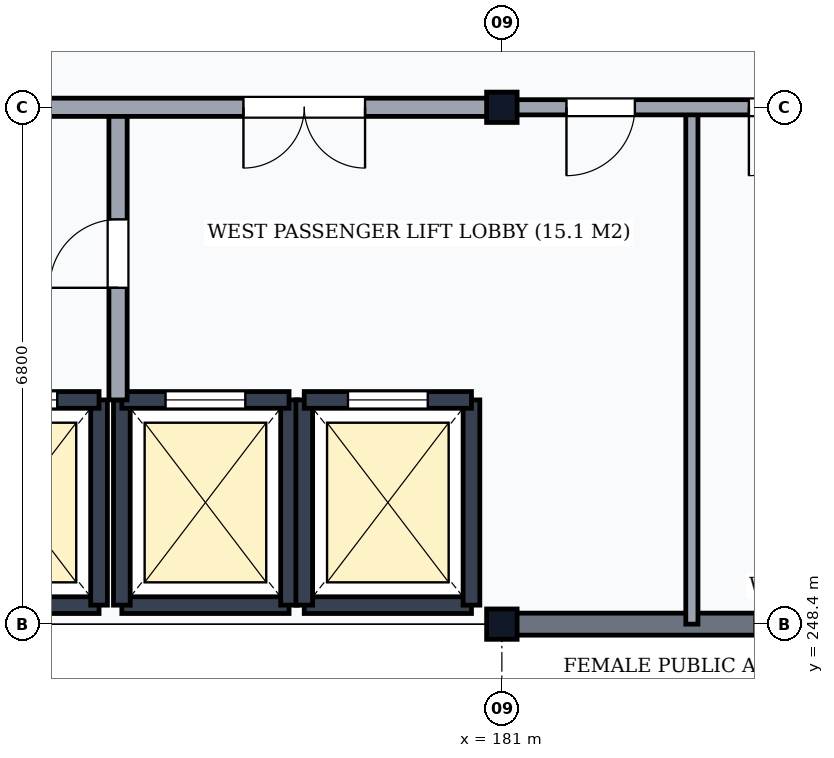
"""IFC4 building model, lengths in metres.
Left out: names, types, materials, properties, quantities, classifications, styles, units other than length and angle.
Written with IfcOpenShell. Run it as: python <this file> out.ifc"""

import sys

from ifc_helpers import new_model, si_unit, direction, frame, frame_2d, origin, origin_2d, place, context, subcontext, project, spatial, rectangle, i_section, extrude, element, fill, save


model = new_model("IFC4")
c1 = context("Model", 3, precision=1e-05, world=origin(), true_north=direction((0.0, 1.0)))
c2 = subcontext(c1, "Body", "Model", "MODEL_VIEW")
j1 = project(units=[si_unit("LENGTHUNIT", "METRE"), si_unit("PLANEANGLEUNIT", "RADIAN")], contexts=[c1])
p1 = place(None, origin())
s1 = spatial("IfcSite", under=j1, at=p1, CompositionType="ELEMENT")
p2 = place(p1, origin())
s2 = spatial("IfcBuilding", under=s1, at=p2, CompositionType="ELEMENT")
p3 = place(p2, frame((0.0, 0.0, 10.5)))
s3 = spatial("IfcBuildingStorey", under=s2, at=p3, CompositionType="ELEMENT", Elevation=10.5)
for number, where, z_axis, x_axis in (
    (1, (181.0, 248.4, 0.0), (0.0, 0.0, 1.0), (1.0, 0.0, 0.0)),
    (2, (181.0, 255.2, 0.0), (0.0, 0.0, 1.0), (1.0, 0.0, 0.0)),
):
    element("IfcColumn", number, at=place(p3, frame(where, z_axis=z_axis, x_axis=x_axis)), inside=s3, PredefinedType="COLUMN", context=c2, shape_type="SweptSolid", body=[
        extrude(i_section(OverallWidth=0.401, OverallDepth=0.399, WebThickness=0.025, FlangeThickness=0.04, FilletRadius=0.015, at=origin_2d()), origin(), (0.0, 0.0, 1.0), 5.1),
    ])
p4 = place(p3, frame((181.006, 248.4, 0.0), z_axis=(0.0, 0.0, 1.0), x_axis=(1.0, 0.0, 0.0)))
e3 = element("IfcWall", 3, at=p4, inside=s3, PredefinedType="SOLIDWALL", context=c2, shape_type="SweptSolid", body=[
    extrude(rectangle(XDim=7.988, YDim=0.29, at=frame_2d((3.994, 0.0))), origin(), (0.0, 0.0, 1.0), 4.528),
])
p5 = place(p4, frame((3.319, 0.0, 0.85)))
e4 = element("IfcOpeningElement", 4, at=p5, cuts=e3, PredefinedType="OPENING", context=c2, shape_type="SweptSolid", body=[
    extrude(rectangle(XDim=0.75, YDim=2.0, at=frame_2d((0.375, 1.0))), frame((0.0, 0.16, 0.0), z_axis=(0.0, -1.0, 0.0), x_axis=(1.0, 0.0, 0.0)), (0.0, 0.0, 1.0), 0.32),
])
p6 = place(p3, frame((173.5, 248.65, 0.0), z_axis=(0.0, 0.0, 1.0), x_axis=(1.0, 0.0, 0.0)))
e5 = element("IfcWall", 5, at=p6, inside=s3, PredefinedType="SHEAR", context=c2, shape_type="SweptSolid", body=[
    extrude(rectangle(XDim=2.2, YDim=0.22, at=frame_2d((1.1, 0.0))), origin(), (0.0, 0.0, 1.0), 4.84),
])
p7 = place(p3, frame((175.7, 248.65, 0.0), z_axis=(0.0, 0.0, 1.0), x_axis=(0.0, 1.0, 0.0)))
e6 = element("IfcWall", 6, at=p7, inside=s3, PredefinedType="SHEAR", context=c2, shape_type="SweptSolid", body=[
    extrude(rectangle(XDim=2.7, YDim=0.22, at=frame_2d((1.35, 0.0))), origin(), (0.0, 0.0, 1.0), 4.84),
])
p8 = place(p3, frame((173.5, 251.35, 0.0), z_axis=(0.0, 0.0, 1.0), x_axis=(1.0, 0.0, 0.0)))
e7 = element("IfcWall", 7, at=p8, inside=s3, PredefinedType="SHEAR", context=c2, shape_type="SweptSolid", body=[
    extrude(rectangle(XDim=2.2, YDim=0.22, at=frame_2d((1.1, 0.0))), origin(), (0.0, 0.0, 1.0), 4.84),
])
p9 = place(p8, frame((0.55, 0.0, 0.0)))
e8 = element("IfcOpeningElement", 8, at=p9, cuts=e7, PredefinedType="OPENING", context=c2, shape_type="SweptSolid", body=[
    extrude(rectangle(XDim=1.1, YDim=2.15, at=frame_2d((0.55, 1.075))), frame((0.0, 0.125, 0.0), z_axis=(0.0, -1.0, 0.0), x_axis=(1.0, 0.0, 0.0)), (0.0, 0.0, 1.0), 0.25),
])
p10 = place(p3, frame((176.0, 248.65, 0.0), z_axis=(0.0, 0.0, 1.0), x_axis=(1.0, 0.0, 0.0)))
e9 = element("IfcWall", 9, at=p10, inside=s3, PredefinedType="SHEAR", context=c2, shape_type="SweptSolid", body=[
    extrude(rectangle(XDim=2.2, YDim=0.22, at=frame_2d((1.1, 0.0))), origin(), (0.0, 0.0, 1.0), 4.84),
])
for number, where, z_axis, x_axis in (
    (10, (176.0, 248.65, 0.0), (0.0, 0.0, 1.0), (0.0, 1.0, 0.0)),
    (11, (178.2, 248.65, 0.0), (0.0, 0.0, 1.0), (0.0, 1.0, 0.0)),
):
    element("IfcWall", number, at=place(p3, frame(where, z_axis=z_axis, x_axis=x_axis)), inside=s3, PredefinedType="SHEAR", context=c2, shape_type="SweptSolid", body=[
        extrude(rectangle(XDim=2.7, YDim=0.22, at=frame_2d((1.35, 0.0))), origin(), (0.0, 0.0, 1.0), 4.84),
    ])
p11 = place(p3, frame((176.0, 251.35, 0.0), z_axis=(0.0, 0.0, 1.0), x_axis=(1.0, 0.0, 0.0)))
e12 = element("IfcWall", 12, at=p11, inside=s3, PredefinedType="SHEAR", context=c2, shape_type="SweptSolid", body=[
    extrude(rectangle(XDim=2.2, YDim=0.22, at=frame_2d((1.1, 0.0))), origin(), (0.0, 0.0, 1.0), 4.84),
])
p12 = place(p11, frame((0.575, 0.0, 0.0)))
e13 = element("IfcOpeningElement", 13, at=p12, cuts=e12, PredefinedType="OPENING", context=c2, shape_type="SweptSolid", body=[
    extrude(rectangle(XDim=1.05, YDim=2.15, at=frame_2d((0.525, 1.075))), frame((0.0, 0.125, 0.0), z_axis=(0.0, -1.0, 0.0), x_axis=(1.0, 0.0, 0.0)), (0.0, 0.0, 1.0), 0.25),
])
p13 = place(p3, frame((178.4, 248.65, 0.0), z_axis=(0.0, 0.0, 1.0), x_axis=(1.0, 0.0, 0.0)))
e14 = element("IfcWall", 14, at=p13, inside=s3, PredefinedType="SHEAR", context=c2, shape_type="SweptSolid", body=[
    extrude(rectangle(XDim=2.2, YDim=0.22, at=frame_2d((1.1, 0.0))), origin(), (0.0, 0.0, 1.0), 4.84),
])
for number, where, z_axis, x_axis in (
    (15, (178.4, 248.65, 0.0), (0.0, 0.0, 1.0), (0.0, 1.0, 0.0)),
    (16, (180.6, 248.65, 0.0), (0.0, 0.0, 1.0), (0.0, 1.0, 0.0)),
):
    element("IfcWall", number, at=place(p3, frame(where, z_axis=z_axis, x_axis=x_axis)), inside=s3, PredefinedType="SHEAR", context=c2, shape_type="SweptSolid", body=[
        extrude(rectangle(XDim=2.7, YDim=0.22, at=frame_2d((1.35, 0.0))), origin(), (0.0, 0.0, 1.0), 4.84),
    ])
p14 = place(p3, frame((178.4, 251.35, 0.0), z_axis=(0.0, 0.0, 1.0), x_axis=(1.0, 0.0, 0.0)))
e17 = element("IfcWall", 17, at=p14, inside=s3, PredefinedType="SHEAR", context=c2, shape_type="SweptSolid", body=[
    extrude(rectangle(XDim=2.2, YDim=0.22, at=frame_2d((1.1, 0.0))), origin(), (0.0, 0.0, 1.0), 4.84),
])
p15 = place(p14, frame((0.575, 0.0, 0.0)))
e18 = element("IfcOpeningElement", 18, at=p15, cuts=e17, PredefinedType="OPENING", context=c2, shape_type="SweptSolid", body=[
    extrude(rectangle(XDim=1.05, YDim=2.15, at=frame_2d((0.525, 1.075))), frame((0.0, 0.125, 0.0), z_axis=(0.0, -1.0, 0.0), x_axis=(1.0, 0.0, 0.0)), (0.0, 0.0, 1.0), 0.25),
])
p16 = place(p3, frame((175.95, 251.35, 0.0), z_axis=(0.0, 0.0, 1.0), x_axis=(0.0, 1.0, 0.0)))
e19 = element("IfcWall", 19, at=p16, inside=s3, PredefinedType="PARTITIONING", context=c2, shape_type="SweptSolid", body=[
    extrude(rectangle(XDim=3.85, YDim=0.24, at=frame_2d((1.925, 0.0))), origin(), (0.0, 0.0, 1.0), 4.84),
])
p17 = place(p16, frame((1.475, 0.0, 0.0)))
e20 = element("IfcOpeningElement", 20, at=p17, cuts=e19, PredefinedType="OPENING", context=c2, shape_type="SweptSolid", body=[
    extrude(rectangle(XDim=0.9, YDim=2.1, at=frame_2d((0.45, 1.05))), frame((0.0, 0.135, 0.0), z_axis=(0.0, -1.0, 0.0), x_axis=(1.0, 0.0, 0.0)), (0.0, 0.0, 1.0), 0.27),
])
p18 = place(p3, frame((183.5, 248.4, 0.0), z_axis=(0.0, 0.0, 1.0), x_axis=(0.0, 1.0, 0.0)))
e21 = element("IfcWall", 21, at=p18, inside=s3, PredefinedType="PARTITIONING", context=c2, shape_type="SweptSolid", body=[
    extrude(rectangle(XDim=6.8, YDim=0.16, at=frame_2d((3.4, 0.0))), origin(), (0.0, 0.0, 1.0), 4.84),
])
p19 = place(p3, frame((173.0, 255.2, 0.0), z_axis=(0.0, 0.0, 1.0), x_axis=(1.0, 0.0, 0.0)))
e22 = element("IfcWall", 22, at=p19, inside=s3, PredefinedType="PARTITIONING", context=c2, shape_type="SweptSolid", body=[
    extrude(rectangle(XDim=8.0, YDim=0.24, at=frame_2d((4.0, 0.0))), origin(), (0.0, 0.0, 1.0), 4.338),
])
p20 = place(p19, frame((1.05, 0.0, 0.0)))
e23 = element("IfcOpeningElement", 23, at=p20, cuts=e22, PredefinedType="OPENING", context=c2, shape_type="SweptSolid", body=[
    extrude(rectangle(XDim=1.0, YDim=2.1, at=frame_2d((0.5, 1.05))), frame((0.0, 0.135, 0.0), z_axis=(0.0, -1.0, 0.0), x_axis=(1.0, 0.0, 0.0)), (0.0, 0.0, 1.0), 0.27),
])
p21 = place(p19, frame((4.6, 0.0, 0.0)))
e24 = element("IfcOpeningElement", 24, at=p21, cuts=e22, PredefinedType="OPENING", context=c2, shape_type="SweptSolid", body=[
    extrude(rectangle(XDim=1.6, YDim=2.25, at=frame_2d((0.8, 1.125))), frame((0.0, 0.135, 0.0), z_axis=(0.0, -1.0, 0.0), x_axis=(1.0, 0.0, 0.0)), (0.0, 0.0, 1.0), 0.27),
])
p22 = place(p3, frame((181.0, 255.2, 0.0), z_axis=(0.0, 0.0, 1.0), x_axis=(1.0, 0.0, 0.0)))
e25 = element("IfcWall", 25, at=p22, inside=s3, PredefinedType="PARTITIONING", context=c2, shape_type="SweptSolid", body=[
    extrude(rectangle(XDim=8.0, YDim=0.2, at=frame_2d((4.0, 0.0))), origin(), (0.0, 0.0, 1.0), 4.338),
])
p23 = place(p22, frame((0.85, 0.0, 0.0)))
e26 = element("IfcOpeningElement", 26, at=p23, cuts=e25, PredefinedType="OPENING", context=c2, shape_type="SweptSolid", body=[
    extrude(rectangle(XDim=0.9, YDim=2.1, at=frame_2d((0.45, 1.05))), frame((0.0, 0.115, 0.0), z_axis=(0.0, -1.0, 0.0), x_axis=(1.0, 0.0, 0.0)), (0.0, 0.0, 1.0), 0.23),
])
p24 = place(p22, frame((3.25, 0.0, 0.0)))
e27 = element("IfcOpeningElement", 27, at=p24, cuts=e25, PredefinedType="OPENING", context=c2, shape_type="SweptSolid", body=[
    extrude(rectangle(XDim=0.9, YDim=2.1, at=frame_2d((0.45, 1.05))), frame((0.0, 0.115, 0.0), z_axis=(0.0, -1.0, 0.0), x_axis=(1.0, 0.0, 0.0)), (0.0, 0.0, 1.0), 0.23),
])
p25 = place(p22, frame((5.075, 0.0, 0.0)))
e28 = element("IfcOpeningElement", 28, at=p25, cuts=e25, PredefinedType="OPENING", context=c2, shape_type="SweptSolid", body=[
    extrude(rectangle(XDim=0.95, YDim=2.1, at=frame_2d((0.475, 1.05))), frame((0.0, 0.115, 0.0), z_axis=(0.0, -1.0, 0.0), x_axis=(1.0, 0.0, 0.0)), (0.0, 0.0, 1.0), 0.23),
])
p26 = place(p22, frame((6.5, 0.0, 0.0)))
e29 = element("IfcOpeningElement", 29, at=p26, cuts=e25, PredefinedType="OPENING", context=c2, shape_type="SweptSolid", body=[
    extrude(rectangle(XDim=0.85, YDim=2.1, at=frame_2d((0.425, 1.05))), frame((0.0, 0.115, 0.0), z_axis=(0.0, -1.0, 0.0), x_axis=(1.0, 0.0, 0.0)), (0.0, 0.0, 1.0), 0.23),
])
p27 = place(p9, origin())
e30 = element("IfcDoor", 30, at=p27, inside=s3, OperationType="DOUBLE_DOOR_SLIDING", PredefinedType="USERDEFINED", context=c2, shape_type="SweptSolid", body=[
    extrude(rectangle(XDim=1.1, YDim=2.15, at=frame_2d((0.55, 1.075))), frame((0.0, 0.025, 0.0), z_axis=(0.0, -1.0, 0.0), x_axis=(1.0, 0.0, 0.0)), (0.0, 0.0, 1.0), 0.05),
])
fill(e8, e30)
p28 = place(p12, origin())
e31 = element("IfcDoor", 31, at=p28, inside=s3, OperationType="DOUBLE_DOOR_SLIDING", PredefinedType="USERDEFINED", context=c2, shape_type="SweptSolid", body=[
    extrude(rectangle(XDim=1.05, YDim=2.15, at=frame_2d((0.525, 1.075))), frame((0.0, 0.025, 0.0), z_axis=(0.0, -1.0, 0.0), x_axis=(1.0, 0.0, 0.0)), (0.0, 0.0, 1.0), 0.05),
])
fill(e13, e31)
p29 = place(p15, origin())
e32 = element("IfcDoor", 32, at=p29, inside=s3, OperationType="DOUBLE_DOOR_SLIDING", PredefinedType="USERDEFINED", context=c2, shape_type="SweptSolid", body=[
    extrude(rectangle(XDim=1.05, YDim=2.15, at=frame_2d((0.525, 1.075))), frame((0.0, 0.025, 0.0), z_axis=(0.0, -1.0, 0.0), x_axis=(1.0, 0.0, 0.0)), (0.0, 0.0, 1.0), 0.05),
])
fill(e18, e32)
p30 = place(p17, origin())
e33 = element("IfcDoor", 33, at=p30, inside=s3, OperationType="SINGLE_SWING_LEFT", PredefinedType="DOOR", context=c2, shape_type="SweptSolid", body=[
    extrude(rectangle(XDim=0.9, YDim=2.1, at=frame_2d((0.45, 1.05))), frame((0.0, 0.025, 0.0), z_axis=(0.0, -1.0, 0.0), x_axis=(1.0, 0.0, 0.0)), (0.0, 0.0, 1.0), 0.05),
])
fill(e20, e33)
p31 = place(p21, frame((1.6, 0.0, 0.0), z_axis=(0.0, 0.0, 1.0), x_axis=(-1.0, 0.0, 0.0)))
e34 = element("IfcDoor", 34, at=p31, inside=s3, OperationType="DOUBLE_DOOR_SINGLE_SWING", PredefinedType="DOOR", context=c2, shape_type="SweptSolid", body=[
    extrude(rectangle(XDim=1.6, YDim=2.25, at=frame_2d((0.8, 1.125))), frame((0.0, 0.025, 0.0), z_axis=(0.0, -1.0, 0.0), x_axis=(1.0, 0.0, 0.0)), (0.0, 0.0, 1.0), 0.05),
])
fill(e24, e34)
p32 = place(p23, frame((0.9, 0.0, 0.0), z_axis=(0.0, 0.0, 1.0), x_axis=(-1.0, 0.0, 0.0)))
e35 = element("IfcDoor", 35, at=p32, inside=s3, OperationType="SINGLE_SWING_RIGHT", PredefinedType="DOOR", context=c2, shape_type="SweptSolid", body=[
    extrude(rectangle(XDim=0.9, YDim=2.1, at=frame_2d((0.45, 1.05))), frame((0.0, 0.025, 0.0), z_axis=(0.0, -1.0, 0.0), x_axis=(1.0, 0.0, 0.0)), (0.0, 0.0, 1.0), 0.05),
])
fill(e26, e35)
p33 = place(p24, frame((0.9, 0.0, 0.0), z_axis=(0.0, 0.0, 1.0), x_axis=(-1.0, 0.0, 0.0)))
e36 = element("IfcDoor", 36, at=p33, inside=s3, OperationType="SINGLE_SWING_RIGHT", PredefinedType="DOOR", context=c2, shape_type="SweptSolid", body=[
    extrude(rectangle(XDim=0.9, YDim=2.1, at=frame_2d((0.45, 1.05))), frame((0.0, 0.025, 0.0), z_axis=(0.0, -1.0, 0.0), x_axis=(1.0, 0.0, 0.0)), (0.0, 0.0, 1.0), 0.05),
])
fill(e27, e36)
save(model, sys.argv[1])
